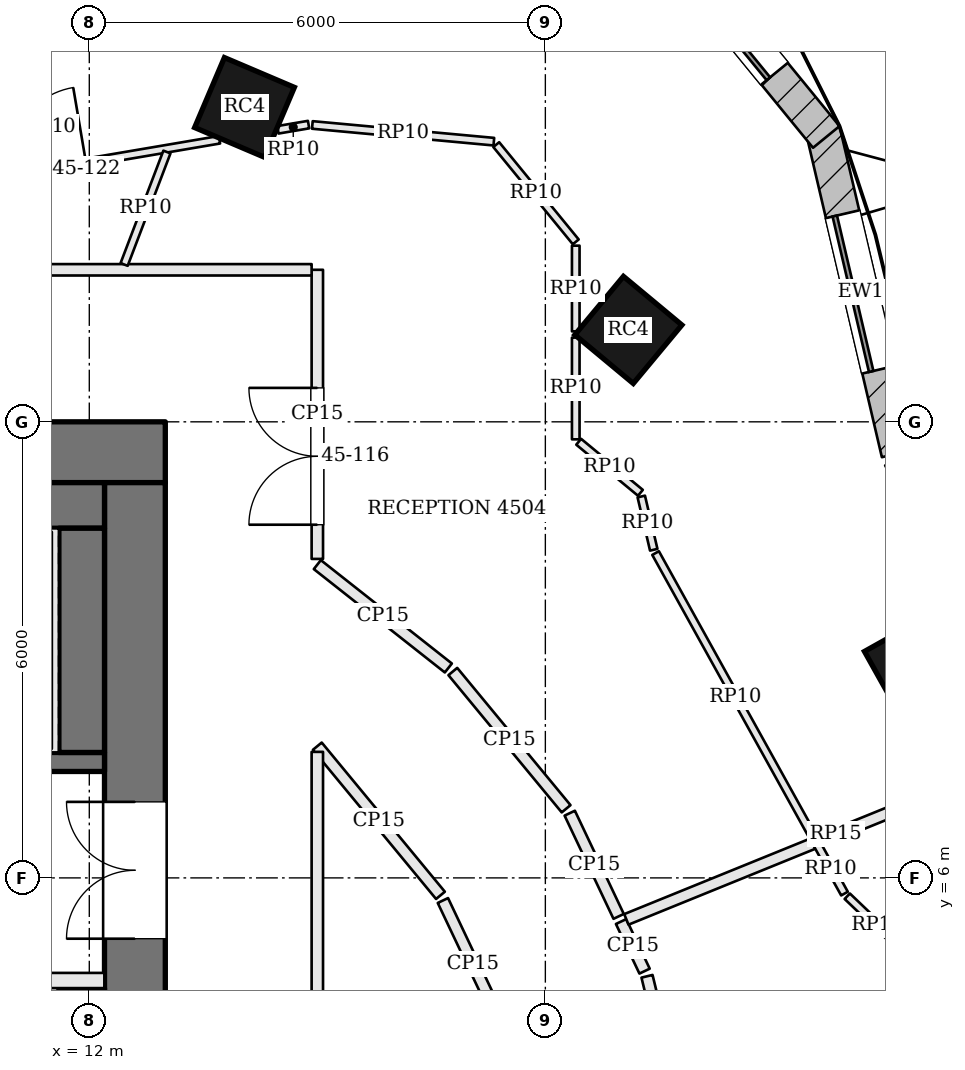
"""IFC4 building model, lengths in metres.
Left out: names, types, materials, properties, quantities, classifications, styles, units other than length and angle.
Written with IfcOpenShell. Run it as: python <this file> out.ifc"""

import sys

from ifc_helpers import new_model, si_unit, direction, frame, frame_2d, origin, origin_2d, place, context, subcontext, project, spatial, rectangle, extrude, element, fill, save


model = new_model("IFC4")
c1 = context("Model", 3, precision=1e-05, world=origin(), true_north=direction((0.0, 1.0)))
c2 = subcontext(c1, "Body", "Model", "MODEL_VIEW")
j1 = project(units=[si_unit("LENGTHUNIT", "METRE"), si_unit("PLANEANGLEUNIT", "RADIAN")], contexts=[c1])
p1 = place(None, origin())
s1 = spatial("IfcSite", under=j1, at=p1, CompositionType="ELEMENT")
p2 = place(p1, origin())
s2 = spatial("IfcBuilding", under=s1, at=p2, CompositionType="ELEMENT")
p3 = place(p2, frame((0.0, 0.0, 185.7)))
s3 = spatial("IfcBuildingStorey", under=s2, at=p3, CompositionType="ELEMENT", Elevation=185.7)
p4 = place(p3, frame((-13.0, 11.6, 0.0), z_axis=(0.0, 0.0, 1.0), x_axis=(1.0, 0.0, 0.0)))
e1 = element("IfcWall", 1, at=p4, inside=s3, PredefinedType="SHEAR", context=c2, shape_type="SweptSolid", body=[
    extrude(rectangle(XDim=26.0, YDim=0.8, at=frame_2d((13.0, 0.0))), origin(), (0.0, 0.0, 1.0), 3.9),
])
p5 = place(p4, frame((9.65, 0.0, 0.0)))
e2 = element("IfcOpeningElement", 2, at=p5, cuts=e1, PredefinedType="OPENING", context=c2, shape_type="SweptSolid", body=[
    extrude(rectangle(XDim=1.0, YDim=2.1, at=frame_2d((0.5, 1.05))), frame((0.0, 0.41, 0.0), z_axis=(0.0, -1.0, 0.0), x_axis=(1.0, 0.0, 0.0)), (0.0, 0.0, 1.0), 0.82),
])
p6 = place(p4, frame((12.675, 0.0, 0.0)))
e3 = element("IfcOpeningElement", 3, at=p6, cuts=e1, PredefinedType="OPENING", context=c2, shape_type="SweptSolid", body=[
    extrude(rectangle(XDim=0.7, YDim=2.1, at=frame_2d((0.35, 1.05))), frame((0.0, 0.41, 0.0), z_axis=(0.0, -1.0, 0.0), x_axis=(1.0, 0.0, 0.0)), (0.0, 0.0, 1.0), 0.82),
])
p7 = place(p4, frame((14.725, 0.0, 0.0)))
e4 = element("IfcOpeningElement", 4, at=p7, cuts=e1, PredefinedType="OPENING", context=c2, shape_type="SweptSolid", body=[
    extrude(rectangle(XDim=0.7, YDim=2.1, at=frame_2d((0.35, 1.05))), frame((0.0, 0.41, 0.0), z_axis=(0.0, -1.0, 0.0), x_axis=(1.0, 0.0, 0.0)), (0.0, 0.0, 1.0), 0.82),
])
p8 = place(p4, frame((16.6, 0.0, 0.0)))
e5 = element("IfcOpeningElement", 5, at=p8, cuts=e1, PredefinedType="OPENING", context=c2, shape_type="SweptSolid", body=[
    extrude(rectangle(XDim=1.0, YDim=2.1, at=frame_2d((0.5, 1.05))), frame((0.0, 0.41, 0.0), z_axis=(0.0, -1.0, 0.0), x_axis=(1.0, 0.0, 0.0)), (0.0, 0.0, 1.0), 0.82),
])
p9 = place(p3, frame((12.6, -2.2, 0.0), z_axis=(0.0, 0.0, 1.0), x_axis=(0.0, 1.0, 0.0)))
e6 = element("IfcWall", 6, at=p9, inside=s3, PredefinedType="SHEAR", context=c2, shape_type="SweptSolid", body=[
    extrude(rectangle(XDim=13.4, YDim=0.8, at=frame_2d((6.7, 0.0))), origin(), (0.0, 0.0, 1.0), 3.9),
])
p10 = place(p9, frame((7.4, 0.0, 0.0)))
e7 = element("IfcOpeningElement", 7, at=p10, cuts=e6, PredefinedType="OPENING", context=c2, shape_type="SweptSolid", body=[
    extrude(rectangle(XDim=1.8, YDim=2.1, at=frame_2d((0.9, 1.05))), frame((0.0, 0.41, 0.0), z_axis=(0.0, -1.0, 0.0), x_axis=(1.0, 0.0, 0.0)), (0.0, 0.0, 1.0), 0.82),
])
for number, where, z_axis, x_axis in (
    (8, (22.879, 8.787, 0.0), (0.0, 0.0, 1.0), (-0.489, 0.873, 0.0)),
    (9, (19.092, 13.209, 0.0), (0.0, 0.0, 1.0), (-0.769, 0.639, 0.0)),
    (10, (14.042, 16.136, 0.0), (0.0, 0.0, 1.0), (-0.92, 0.392, 0.0)),
):
    element("IfcColumn", number, at=place(p3, frame(where, z_axis=z_axis, x_axis=x_axis)), inside=s3, PredefinedType="COLUMN", context=c2, shape_type="SweptSolid", body=[
        extrude(rectangle(XDim=1.0, YDim=1.0, at=origin_2d()), origin(), (0.0, 0.0, 1.0), 3.9),
    ])
p11 = place(p3, frame((24.662, 7.939, 0.0), z_axis=(0.0, 0.0, 1.0), x_axis=(-0.485153910721, 0.874428775208, 0.0)))
e11 = element("IfcWall", 11, at=p11, inside=s3, PredefinedType="SOLIDWALL", context=c2, shape_type="SweptSolid", body=[
    extrude(rectangle(XDim=4.112, YDim=0.45, at=frame_2d((2.056, 0.0))), origin(), (0.0, 0.0, 1.0), 3.7),
])
p12 = place(p11, frame((1.156, 0.0, 0.9)))
e12 = element("IfcOpeningElement", 12, at=p12, cuts=e11, PredefinedType="OPENING", context=c2, shape_type="SweptSolid", body=[
    extrude(rectangle(XDim=1.8, YDim=2.3, at=frame_2d((0.9, 1.15))), frame((0.0, 0.235, 0.0), z_axis=(0.0, -1.0, 0.0), x_axis=(1.0, 0.0, 0.0)), (0.0, 0.0, 1.0), 0.47),
])
p13 = place(p3, frame((22.646, 11.586, 0.0), z_axis=(0.0, 0.0, 1.0), x_axis=(-0.227925124198, 0.973678662475, 0.0)))
e13 = element("IfcWall", 13, at=p13, inside=s3, PredefinedType="SOLIDWALL", context=c2, shape_type="SweptSolid", body=[
    extrude(rectangle(XDim=4.361, YDim=0.45, at=frame_2d((2.18, 0.0))), origin(), (0.0, 0.0, 1.0), 3.7),
])
p14 = place(p13, frame((1.13, 0.0, 0.9)))
e14 = element("IfcOpeningElement", 14, at=p14, cuts=e13, PredefinedType="OPENING", context=c2, shape_type="SweptSolid", body=[
    extrude(rectangle(XDim=2.1, YDim=2.3, at=frame_2d((1.05, 1.15))), frame((0.0, 0.235, 0.0), z_axis=(0.0, -1.0, 0.0), x_axis=(1.0, 0.0, 0.0)), (0.0, 0.0, 1.0), 0.47),
])
p15 = place(p3, frame((21.696, 15.748, 0.0), z_axis=(0.0, 0.0, 1.0), x_axis=(-0.632968710519, 0.774177377288, 0.0)))
e15 = element("IfcWall", 15, at=p15, inside=s3, PredefinedType="SOLIDWALL", context=c2, shape_type="SweptSolid", body=[
    extrude(rectangle(XDim=4.25, YDim=0.45, at=frame_2d((2.125, 0.0))), origin(), (0.0, 0.0, 1.0), 3.7),
])
p16 = place(p15, frame((1.075, 0.0, 0.9)))
e16 = element("IfcOpeningElement", 16, at=p16, cuts=e15, PredefinedType="OPENING", context=c2, shape_type="SweptSolid", body=[
    extrude(rectangle(XDim=2.1, YDim=2.3, at=frame_2d((1.05, 1.15))), frame((0.0, 0.235, 0.0), z_axis=(0.0, -1.0, 0.0), x_axis=(1.0, 0.0, 0.0)), (0.0, 0.0, 1.0), 0.47),
])
p17 = place(p3, frame((12.2, 7.525, 0.0), z_axis=(0.0, 0.0, 1.0), x_axis=(-1.0, 0.0, 0.0)))
e17 = element("IfcWall", 17, at=p17, inside=s3, PredefinedType="SOLIDWALL", context=c2, shape_type="SweptSolid", body=[
    extrude(rectangle(XDim=7.1, YDim=0.25, at=frame_2d((3.55, 0.0))), origin(), (0.0, 0.0, 1.0), 3.7),
])
p18 = place(p17, frame((5.8, 0.0, 0.0)))
e18 = element("IfcOpeningElement", 18, at=p18, cuts=e17, PredefinedType="OPENING", context=c2, shape_type="SweptSolid", body=[
    extrude(rectangle(XDim=1.2, YDim=2.1, at=frame_2d((0.6, 1.05))), frame((0.0, 0.135, 0.0), z_axis=(0.0, -1.0, 0.0), x_axis=(1.0, 0.0, 0.0)), (0.0, 0.0, 1.0), 0.27),
])
p19 = place(p3, frame((12.2, 4.65, 0.0), z_axis=(0.0, 0.0, 1.0), x_axis=(-1.0, 0.0, 0.0)))
e19 = element("IfcWall", 19, at=p19, inside=s3, PredefinedType="SOLIDWALL", context=c2, shape_type="SweptSolid", body=[
    extrude(rectangle(XDim=7.1, YDim=0.2, at=frame_2d((3.55, 0.0))), origin(), (0.0, 0.0, 1.0), 3.7),
])
p20 = place(p19, frame((4.4, 0.0, 0.0)))
e20 = element("IfcOpeningElement", 20, at=p20, cuts=e19, PredefinedType="OPENING", context=c2, shape_type="SweptSolid", body=[
    extrude(rectangle(XDim=1.2, YDim=2.1, at=frame_2d((0.6, 1.05))), frame((0.0, 0.11, 0.0), z_axis=(0.0, -1.0, 0.0), x_axis=(1.0, 0.0, 0.0)), (0.0, 0.0, 1.0), 0.22),
])
p21 = place(p19, frame((1.1, 0.0, 0.0)))
e21 = element("IfcOpeningElement", 21, at=p21, cuts=e19, PredefinedType="OPENING", context=c2, shape_type="SweptSolid", body=[
    extrude(rectangle(XDim=1.2, YDim=2.1, at=frame_2d((0.6, 1.05))), frame((0.0, 0.11, 0.0), z_axis=(0.0, -1.0, 0.0), x_axis=(1.0, 0.0, 0.0)), (0.0, 0.0, 1.0), 0.22),
])
p22 = place(p3, frame((12.2, 10.9, 0.0), z_axis=(0.0, 0.0, 1.0), x_axis=(-1.0, 0.0, 0.0)))
e22 = element("IfcWall", 22, at=p22, inside=s3, PredefinedType="SOLIDWALL", context=c2, shape_type="SweptSolid", body=[
    extrude(rectangle(XDim=7.1, YDim=0.6, at=frame_2d((3.55, 0.0))), origin(), (0.0, 0.0, 1.0), 3.7),
])
p23 = place(p3, frame((11.9, 10.6, 0.0), z_axis=(0.0, 0.0, 1.0), x_axis=(0.0, -1.0, 0.0)))
e23 = element("IfcWall", 23, at=p23, inside=s3, PredefinedType="SOLIDWALL", context=c2, shape_type="SweptSolid", body=[
    extrude(rectangle(XDim=2.95, YDim=0.6, at=frame_2d((1.475, 0.0))), origin(), (0.0, 0.0, 1.0), 3.7),
])
p24 = place(p3, frame((11.9, 4.55, 0.0), z_axis=(0.0, 0.0, 1.0), x_axis=(0.0, -1.0, 0.0)))
e24 = element("IfcWall", 24, at=p24, inside=s3, PredefinedType="SOLIDWALL", context=c2, shape_type="SweptSolid", body=[
    extrude(rectangle(XDim=3.0, YDim=0.6, at=frame_2d((1.5, 0.0))), origin(), (0.0, 0.0, 1.0), 3.7),
])
p25 = place(p3, frame((19.722, 3.125, 0.0), z_axis=(0.0, 0.0, 1.0), x_axis=(-0.236703930685, 0.971581828359, 0.0)))
e25 = element("IfcWall", 25, at=p25, inside=s3, PredefinedType="PARTITIONING", context=c2, shape_type="SweptSolid", body=[
    extrude(rectangle(XDim=1.626, YDim=0.15, at=frame_2d((0.813, 0.0))), origin(), (0.0, 0.0, 1.0), 3.084),
])
p26 = place(p3, frame((19.305, 4.773, 0.0), z_axis=(0.0, 0.0, 1.0), x_axis=(-0.42817357332, 0.903696514938, 0.0)))
e26 = element("IfcWall", 26, at=p26, inside=s3, PredefinedType="PARTITIONING", context=c2, shape_type="SweptSolid", body=[
    extrude(rectangle(XDim=0.722, YDim=0.15, at=frame_2d((0.361, 0.0))), origin(), (0.0, 0.0, 1.0), 3.084),
])
p27 = place(p3, frame((24.574, 7.692, 0.0), z_axis=(0.0, 0.0, 1.0), x_axis=(-0.926449572976, -0.376418900606, 0.0)))
e27 = element("IfcWall", 27, at=p27, inside=s3, PredefinedType="PARTITIONING", context=c2, shape_type="SweptSolid", body=[
    extrude(rectangle(XDim=5.946, YDim=0.15, at=frame_2d((2.973, 0.0))), origin(), (0.0, 0.0, 1.0), 3.084),
])
p28 = place(p3, frame((18.964, 5.494, 0.0), z_axis=(0.0, 0.0, 1.0), x_axis=(-0.428135235203, 0.903714678633, 0.0)))
e28 = element("IfcWall", 28, at=p28, inside=s3, PredefinedType="PARTITIONING", context=c2, shape_type="SweptSolid", body=[
    extrude(rectangle(XDim=1.503, YDim=0.15, at=frame_2d((0.751, 0.0))), origin(), (0.0, 0.0, 1.0), 3.084),
])
p29 = place(p3, frame((18.273, 6.909, 0.0), z_axis=(0.0, 0.0, 1.0), x_axis=(-0.63653648943, 0.771246586783, 0.0)))
e29 = element("IfcWall", 29, at=p29, inside=s3, PredefinedType="PARTITIONING", context=c2, shape_type="SweptSolid", body=[
    extrude(rectangle(XDim=2.342, YDim=0.15, at=frame_2d((1.171, 0.0))), origin(), (0.0, 0.0, 1.0), 3.084),
])
p30 = place(p3, frame((16.724, 8.761, 0.0), z_axis=(0.0, 0.0, 1.0), x_axis=(-0.785124633057, 0.619337800047, 0.0)))
e30 = element("IfcWall", 30, at=p30, inside=s3, PredefinedType="PARTITIONING", context=c2, shape_type="SweptSolid", body=[
    extrude(rectangle(XDim=2.196, YDim=0.15, at=frame_2d((1.098, 0.0))), origin(), (0.0, 0.0, 1.0), 3.084),
])
p31 = place(p3, frame((15.0, 10.196, 0.0), z_axis=(0.0, 0.0, 1.0), x_axis=(0.0, 1.0, 0.0)))
e31 = element("IfcWall", 31, at=p31, inside=s3, PredefinedType="PARTITIONING", context=c2, shape_type="SweptSolid", body=[
    extrude(rectangle(XDim=3.804, YDim=0.15, at=frame_2d((1.902, 0.0))), origin(), (0.0, 0.0, 1.0), 3.084),
])
p32 = place(p31, frame((0.45, 0.0, 0.0)))
e32 = element("IfcOpeningElement", 32, at=p32, cuts=e31, PredefinedType="OPENING", context=c2, shape_type="SweptSolid", body=[
    extrude(rectangle(XDim=1.8, YDim=2.1, at=frame_2d((0.9, 1.05))), frame((0.0, 0.085, 0.0), z_axis=(0.0, -1.0, 0.0), x_axis=(1.0, 0.0, 0.0)), (0.0, 0.0, 1.0), 0.17),
])
p33 = place(p3, frame((14.925, 14.0, 0.0), z_axis=(0.0, 0.0, 1.0), x_axis=(-1.0, 0.0, 0.0)))
e33 = element("IfcWall", 33, at=p33, inside=s3, PredefinedType="PARTITIONING", context=c2, shape_type="SweptSolid", body=[
    extrude(rectangle(XDim=14.907, YDim=0.15, at=frame_2d((7.454, 0.0))), origin(), (0.0, 0.0, 1.0), 3.084),
])
p34 = place(p33, frame((5.432, 0.0, 0.0)))
e34 = element("IfcOpeningElement", 34, at=p34, cuts=e33, PredefinedType="OPENING", context=c2, shape_type="SweptSolid", body=[
    extrude(rectangle(XDim=1.0, YDim=2.4, at=frame_2d((0.5, 1.2))), frame((0.0, 0.085, 0.0), z_axis=(0.0, -1.0, 0.0), x_axis=(1.0, 0.0, 0.0)), (0.0, 0.0, 1.0), 0.17),
])
p35 = place(p33, frame((11.55, 0.0, 0.0)))
e35 = element("IfcOpeningElement", 35, at=p35, cuts=e33, PredefinedType="OPENING", context=c2, shape_type="SweptSolid", body=[
    extrude(rectangle(XDim=1.0, YDim=2.1, at=frame_2d((0.5, 1.05))), frame((0.0, 0.085, 0.0), z_axis=(0.0, -1.0, 0.0), x_axis=(1.0, 0.0, 0.0)), (0.0, 0.0, 1.0), 0.17),
])
p36 = place(p3, frame((15.0, 7.733, 0.0), z_axis=(0.0, 0.0, 1.0), x_axis=(0.636601263488, -0.771193121938, 0.0)))
e36 = element("IfcWall", 36, at=p36, inside=s3, PredefinedType="PARTITIONING", context=c2, shape_type="SweptSolid", body=[
    extrude(rectangle(XDim=2.545, YDim=0.15, at=frame_2d((1.272, 0.0))), origin(), (0.0, 0.0, 1.0), 3.084),
])
p37 = place(p3, frame((16.652, 5.702, 0.0), z_axis=(0.0, 0.0, 1.0), x_axis=(0.428126129773, -0.903718992279, 0.0)))
e37 = element("IfcWall", 37, at=p37, inside=s3, PredefinedType="PARTITIONING", context=c2, shape_type="SweptSolid", body=[
    extrude(rectangle(XDim=1.846, YDim=0.15, at=frame_2d((0.923, 0.0))), origin(), (0.0, 0.0, 1.0), 3.084),
])
p38 = place(p3, frame((15.0, -4.925, 0.0), z_axis=(0.0, 0.0, 1.0), x_axis=(0.0, 1.0, 0.0)))
e38 = element("IfcWall", 38, at=p38, inside=s3, PredefinedType="PARTITIONING", context=c2, shape_type="SweptSolid", body=[
    extrude(rectangle(XDim=12.583, YDim=0.15, at=frame_2d((6.292, 0.0))), origin(), (0.0, 0.0, 1.0), 3.084),
])
p39 = place(p38, frame((5.791, 0.0, 0.0)))
e39 = element("IfcOpeningElement", 39, at=p39, cuts=e38, PredefinedType="OPENING", context=c2, shape_type="SweptSolid", body=[
    extrude(rectangle(XDim=1.0, YDim=2.4, at=frame_2d((0.5, 1.2))), frame((0.0, 0.085, 0.0), z_axis=(0.0, -1.0, 0.0), x_axis=(1.0, 0.0, 0.0)), (0.0, 0.0, 1.0), 0.17),
])
p40 = place(p3, frame((21.571, 6.45, 0.0), z_axis=(0.0, 0.0, 1.0), x_axis=(0.485146235322, -0.874433033658, 0.0)))
e40 = element("IfcWall", 40, at=p40, inside=s3, PredefinedType="PARTITIONING", context=c2, shape_type="SweptSolid", body=[
    extrude(rectangle(XDim=0.751, YDim=0.1, at=frame_2d((0.375, 0.0))), origin(), (0.0, 0.0, 1.0), 3.084),
])
p41 = place(p3, frame((21.972, 5.759, 0.0), z_axis=(0.0, 0.0, 1.0), x_axis=(0.722719124143, -0.691141857796, 0.0)))
e41 = element("IfcWall", 41, at=p41, inside=s3, PredefinedType="PARTITIONING", context=c2, shape_type="SweptSolid", body=[
    extrude(rectangle(XDim=1.098, YDim=0.1, at=frame_2d((0.549, 0.0))), origin(), (0.0, 0.0, 1.0), 3.084),
])
p42 = place(p3, frame((9.245, 14.952, 0.0), z_axis=(0.0, 0.0, 1.0), x_axis=(0.985863233989, 0.167552033319, 0.0)))
e42 = element("IfcWall", 42, at=p42, inside=s3, PredefinedType="PARTITIONING", context=c2, shape_type="SweptSolid", body=[
    extrude(rectangle(XDim=4.531, YDim=0.1, at=frame_2d((2.266, 0.0))), origin(), (0.0, 0.0, 1.0), 3.084),
])
p43 = place(p42, frame((1.75, 0.0, 0.0)))
e43 = element("IfcOpeningElement", 43, at=p43, cuts=e42, PredefinedType="OPENING", context=c2, shape_type="SweptSolid", body=[
    extrude(rectangle(XDim=1.0, YDim=2.4, at=frame_2d((0.5, 1.2))), frame((0.0, 0.06, 0.0), z_axis=(0.0, -1.0, 0.0), x_axis=(1.0, 0.0, 0.0)), (0.0, 0.0, 1.0), 0.12),
])
p44 = place(p3, frame((14.482, 15.842, 0.0), z_axis=(0.0, 0.0, 1.0), x_axis=(0.985806446381, 0.167885825111, 0.0)))
e44 = element("IfcWall", 44, at=p44, inside=s3, PredefinedType="PARTITIONING", context=c2, shape_type="SweptSolid", body=[
    extrude(rectangle(XDim=0.409, YDim=0.1, at=frame_2d((0.204, 0.0))), origin(), (0.0, 0.0, 1.0), 3.084),
])
p45 = place(p3, frame((14.935, 15.906, 0.0), z_axis=(0.0, 0.0, 1.0), x_axis=(0.995783150827, -0.09173830459, 0.0)))
e45 = element("IfcWall", 45, at=p45, inside=s3, PredefinedType="PARTITIONING", context=c2, shape_type="SweptSolid", body=[
    extrude(rectangle(XDim=2.398, YDim=0.1, at=frame_2d((1.199, 0.0))), origin(), (0.0, 0.0, 1.0), 3.084),
])
p46 = place(p3, frame((17.354, 15.647, 0.0), z_axis=(0.0, 0.0, 1.0), x_axis=(0.632948103301, -0.774194225326, 0.0)))
e46 = element("IfcWall", 46, at=p46, inside=s3, PredefinedType="PARTITIONING", context=c2, shape_type="SweptSolid", body=[
    extrude(rectangle(XDim=1.652, YDim=0.1, at=frame_2d((0.826, 0.0))), origin(), (0.0, 0.0, 1.0), 3.084),
])
p47 = place(p3, frame((18.4, 14.318, 0.0), z_axis=(0.0, 0.0, 1.0), x_axis=(0.0, -1.0, 0.0)))
e47 = element("IfcWall", 47, at=p47, inside=s3, PredefinedType="PARTITIONING", context=c2, shape_type="SweptSolid", body=[
    extrude(rectangle(XDim=1.127, YDim=0.1, at=frame_2d((0.564, 0.0))), origin(), (0.0, 0.0, 1.0), 3.084),
])
p48 = place(p3, frame((18.4, 13.108, 0.0), z_axis=(0.0, 0.0, 1.0), x_axis=(0.0, -1.0, 0.0)))
e48 = element("IfcWall", 48, at=p48, inside=s3, PredefinedType="PARTITIONING", context=c2, shape_type="SweptSolid", body=[
    extrude(rectangle(XDim=1.338, YDim=0.1, at=frame_2d((0.669, 0.0))), origin(), (0.0, 0.0, 1.0), 3.084),
])
p49 = place(p3, frame((18.438, 11.738, 0.0), z_axis=(0.0, 0.0, 1.0), x_axis=(0.77057087269, -0.637354320737, 0.0)))
e49 = element("IfcWall", 49, at=p49, inside=s3, PredefinedType="PARTITIONING", context=c2, shape_type="SweptSolid", body=[
    extrude(rectangle(XDim=1.054, YDim=0.1, at=frame_2d((0.527, 0.0))), origin(), (0.0, 0.0, 1.0), 3.084),
])
p50 = place(p3, frame((19.262, 11.017, 0.0), z_axis=(0.0, 0.0, 1.0), x_axis=(0.228055604604, -0.973648109539, 0.0)))
e50 = element("IfcWall", 50, at=p50, inside=s3, PredefinedType="PARTITIONING", context=c2, shape_type="SweptSolid", body=[
    extrude(rectangle(XDim=0.719, YDim=0.1, at=frame_2d((0.36, 0.0))), origin(), (0.0, 0.0, 1.0), 3.084),
])
p51 = place(p3, frame((19.45, 10.273, 0.0), z_axis=(0.0, 0.0, 1.0), x_axis=(0.485130780077, -0.87444160824, 0.0)))
e51 = element("IfcWall", 51, at=p51, inside=s3, PredefinedType="PARTITIONING", context=c2, shape_type="SweptSolid", body=[
    extrude(rectangle(XDim=4.332, YDim=0.1, at=frame_2d((2.166, 0.0))), origin(), (0.0, 0.0, 1.0), 3.084),
])
p52 = place(p3, frame((12.458, 14.07, 0.0), z_axis=(0.0, 0.0, 1.0), x_axis=(0.3557324153, 0.934587849645, 0.0)))
e52 = element("IfcWall", 52, at=p52, inside=s3, PredefinedType="PARTITIONING", context=c2, shape_type="SweptSolid", body=[
    extrude(rectangle(XDim=1.583, YDim=0.1, at=frame_2d((0.792, 0.0))), origin(), (0.0, 0.0, 1.0), 3.084),
])
p53 = place(p14, origin())
e53 = element("IfcWindow", 53, at=p53, inside=s3, PartitioningType="SINGLE_PANEL", PredefinedType="WINDOW", context=c2, shape_type="SweptSolid", body=[
    extrude(rectangle(XDim=2.1, YDim=2.3, at=frame_2d((1.05, 1.15))), frame((0.0, 0.135, 0.0), z_axis=(0.0, -1.0, 0.0), x_axis=(1.0, 0.0, 0.0)), (0.0, 0.0, 1.0), 0.06),
])
fill(e14, e53)
p54 = place(p16, origin())
e54 = element("IfcWindow", 54, at=p54, inside=s3, PartitioningType="SINGLE_PANEL", PredefinedType="WINDOW", context=c2, shape_type="SweptSolid", body=[
    extrude(rectangle(XDim=2.1, YDim=2.3, at=frame_2d((1.05, 1.15))), frame((0.0, 0.135, 0.0), z_axis=(0.0, -1.0, 0.0), x_axis=(1.0, 0.0, 0.0)), (0.0, 0.0, 1.0), 0.06),
])
fill(e16, e54)
p55 = place(p10, origin())
e55 = element("IfcDoor", 55, at=p55, inside=s3, OperationType="DOUBLE_DOOR_SINGLE_SWING", PredefinedType="DOOR", context=c2, shape_type="SweptSolid", body=[
    extrude(rectangle(XDim=1.8, YDim=2.1, at=frame_2d((0.9, 1.05))), frame((0.0, 0.025, 0.0), z_axis=(0.0, -1.0, 0.0), x_axis=(1.0, 0.0, 0.0)), (0.0, 0.0, 1.0), 0.05),
])
fill(e7, e55)
p56 = place(p32, origin())
e56 = element("IfcDoor", 56, at=p56, inside=s3, OperationType="DOUBLE_DOOR_SINGLE_SWING", PredefinedType="DOOR", context=c2, shape_type="SweptSolid", body=[
    extrude(rectangle(XDim=1.8, YDim=2.1, at=frame_2d((0.9, 1.05))), frame((0.0, 0.025, 0.0), z_axis=(0.0, -1.0, 0.0), x_axis=(1.0, 0.0, 0.0)), (0.0, 0.0, 1.0), 0.05),
])
fill(e32, e56)
p57 = place(p43, origin())
e57 = element("IfcDoor", 57, at=p57, inside=s3, OperationType="SINGLE_SWING_RIGHT", PredefinedType="DOOR", context=c2, shape_type="SweptSolid", body=[
    extrude(rectangle(XDim=1.0, YDim=2.4, at=frame_2d((0.5, 1.2))), frame((0.0, 0.025, 0.0), z_axis=(0.0, -1.0, 0.0), x_axis=(1.0, 0.0, 0.0)), (0.0, 0.0, 1.0), 0.05),
])
fill(e43, e57)
save(model, sys.argv[1])
